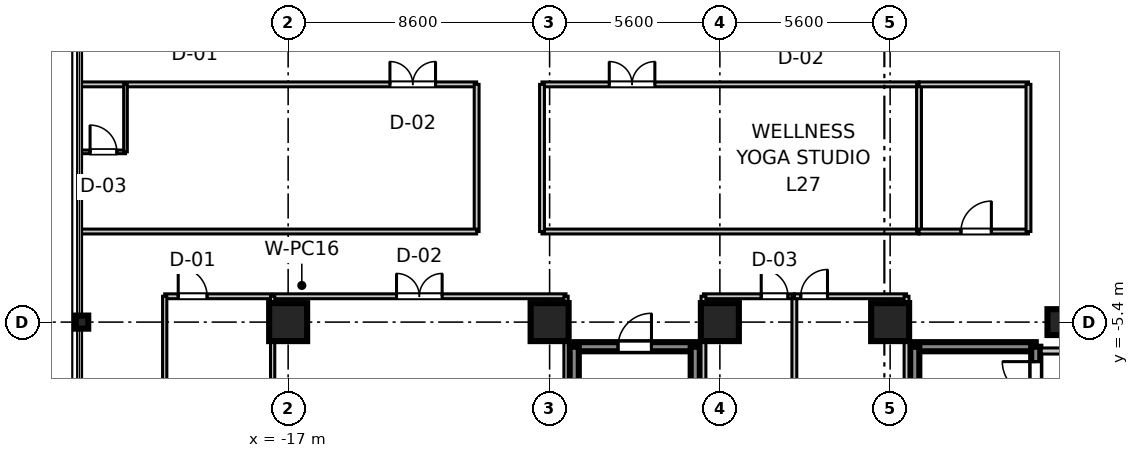
"""IFC4 building model, lengths in metres.
Left out: names, types, materials, properties, quantities, classifications, styles, units other than length and angle.
Written with IfcOpenShell. Run it as: python <this file> out.ifc"""

import sys

from ifc_helpers import new_model, si_unit, direction, frame, frame_2d, origin, origin_2d, place, context, subcontext, project, spatial, rectangle, i_section, extrude, source, transform, mapped, element, fill, save


model = new_model("IFC4")
c1 = context("Model", 3, precision=1e-05, world=origin(), true_north=direction((0.0, 1.0)))
c2 = subcontext(c1, "Body", "Model", "MODEL_VIEW")
j1 = project(units=[si_unit("LENGTHUNIT", "METRE"), si_unit("PLANEANGLEUNIT", "RADIAN")], contexts=[c1])
p1 = place(None, origin())
s1 = spatial("IfcSite", under=j1, at=p1, CompositionType="ELEMENT")
p2 = place(p1, origin())
s2 = spatial("IfcBuilding", under=s1, at=p2, CompositionType="ELEMENT")
p3 = place(p2, frame((0.0, 0.0, 110.2)))
s3 = spatial("IfcBuildingStorey", under=s2, at=p3, CompositionType="ELEMENT", Elevation=110.2)
m1 = source(origin(), c2, "Body", "SweptSolid", [
    extrude(rectangle(XDim=1.25, YDim=1.25, at=origin_2d()), origin(), (0.0, 0.0, 1.0), 3.605),
])
for number, where, z_axis, x_axis in (
    (1, (-17.0, -5.4, 0.0), (0.0, 0.0, 1.0), (1.0, 0.0, 0.0)),
    (2, (-8.4, -5.4, 0.0), (0.0, 0.0, 1.0), (1.0, 0.0, 0.0)),
    (3, (-2.8, -5.4, 0.0), (0.0, 0.0, 1.0), (1.0, 0.0, 0.0)),
    (4, (2.8, -5.4, 0.0), (0.0, 0.0, 1.0), (1.0, 0.0, 0.0)),
):
    element("IfcColumn", number, at=place(p3, frame(where, z_axis=z_axis, x_axis=x_axis)), inside=s3, PredefinedType="COLUMN", context=c2, shape_type="MappedRepresentation", body=[
        mapped(m1, transform((0.0, 0.0, 0.0), scale=1.0)),
    ])
m2 = source(origin(), c2, "Body", "SweptSolid", [
    extrude(rectangle(XDim=0.85, YDim=0.85, at=origin_2d()), origin(), (0.0, 0.0, 1.0), 3.605),
])
p4 = place(p3, frame((8.4, -5.4, 0.0), z_axis=(0.0, 0.0, 1.0), x_axis=(1.0, 0.0, 0.0)))
e5 = element("IfcColumn", 5, at=p4, inside=s3, PredefinedType="PILASTER", context=c2, shape_type="MappedRepresentation", body=[
    mapped(m2, transform((0.0, 0.0, 0.0), scale=1.0)),
])
m3 = source(origin(), c2, "Body", "SweptSolid", [
    extrude(i_section(OverallWidth=0.409, OverallDepth=0.43, WebThickness=0.021, FlangeThickness=0.034, at=origin_2d()), origin(), (0.0, 0.0, 1.0), 3.605),
])
p5 = place(p3, frame((-23.78, -5.4, 0.0), z_axis=(0.0, 0.0, 1.0), x_axis=(1.0, 0.0, 0.0)))
e6 = element("IfcColumn", 6, at=p5, inside=s3, PredefinedType="COLUMN", context=c2, shape_type="MappedRepresentation", body=[
    mapped(m3, transform((0.0, 0.0, 0.0), scale=1.0)),
])
m4 = source(origin(), c2, "Body", "SweptSolid", [
    extrude(rectangle(XDim=3.98, YDim=0.3, at=frame_2d((1.99, 0.0))), origin(), (0.0, 0.0, 1.0), 3.38),
])
p6 = place(p3, frame((3.61, -6.21, 0.0), z_axis=(0.0, 0.0, 1.0), x_axis=(1.0, 0.0, 0.0)))
e7 = element("IfcWall", 7, at=p6, inside=s3, PredefinedType="SHEAR", context=c2, shape_type="MappedRepresentation", body=[
    mapped(m4, transform((0.0, 0.0, 0.0), scale=1.0)),
])
m5 = source(origin(), c2, "Body", "SweptSolid", [
    extrude(rectangle(XDim=9.38, YDim=0.3, at=frame_2d((4.69, 0.0))), origin(), (0.0, 0.0, 1.0), 3.38),
])
p7 = place(p3, frame((3.61, -15.59, 0.0), z_axis=(0.0, 0.0, 1.0), x_axis=(0.0, 1.0, 0.0)))
e8 = element("IfcWall", 8, at=p7, inside=s3, PredefinedType="SHEAR", context=c2, shape_type="MappedRepresentation", body=[
    mapped(m5, transform((0.0, 0.0, 0.0), scale=1.0)),
])
p8 = place(p3, frame((7.59, -15.59, 0.0), z_axis=(0.0, 0.0, 1.0), x_axis=(0.0, 1.0, 0.0)))
e9 = element("IfcWall", 9, at=p8, inside=s3, PredefinedType="SHEAR", context=c2, shape_type="MappedRepresentation", body=[
    mapped(m5, transform((0.0, 0.0, 0.0), scale=1.0)),
])
p9 = place(p8, frame((7.79, 0.0, 0.0)))
e10 = element("IfcOpeningElement", 10, at=p9, cuts=e9, PredefinedType="OPENING", context=c2, shape_type="SweptSolid", body=[
    extrude(rectangle(XDim=1.1, YDim=2.15, at=frame_2d((0.55, 1.075))), frame((0.0, 0.16, 0.0), z_axis=(0.0, -1.0, 0.0), x_axis=(1.0, 0.0, 0.0)), (0.0, 0.0, 1.0), 0.32),
])
p10 = place(p3, frame((-7.59, -6.21, 0.0), z_axis=(0.0, 0.0, 1.0), x_axis=(1.0, 0.0, 0.0)))
e11 = element("IfcWall", 11, at=p10, inside=s3, PredefinedType="SHEAR", context=c2, shape_type="MappedRepresentation", body=[
    mapped(m4, transform((0.0, 0.0, 0.0), scale=1.0)),
])
p11 = place(p10, frame((1.44, 0.0, 0.0)))
e12 = element("IfcOpeningElement", 12, at=p11, cuts=e11, PredefinedType="OPENING", context=c2, shape_type="SweptSolid", body=[
    extrude(rectangle(XDim=1.1, YDim=2.15, at=frame_2d((0.55, 1.075))), frame((0.0, 0.16, 0.0), z_axis=(0.0, -1.0, 0.0), x_axis=(1.0, 0.0, 0.0)), (0.0, 0.0, 1.0), 0.32),
])
for number, where, z_axis, x_axis in (
    (13, (-7.59, -15.59, 0.0), (0.0, 0.0, 1.0), (0.0, 1.0, 0.0)),
    (14, (-3.61, -15.59, 0.0), (0.0, 0.0, 1.0), (0.0, 1.0, 0.0)),
):
    element("IfcWall", number, at=place(p3, frame(where, z_axis=z_axis, x_axis=x_axis)), inside=s3, PredefinedType="SHEAR", context=c2, shape_type="MappedRepresentation", body=[
        mapped(m5, transform((0.0, 0.0, 0.0), scale=1.0)),
    ])
m6 = source(origin(), c2, "Body", "SweptSolid", [
    extrude(rectangle(XDim=0.97, YDim=0.2, at=frame_2d((0.485, 0.0))), origin(), (0.0, 0.0, 1.0), 2.72),
])
p12 = place(p3, frame((7.77, -6.35, 0.0), z_axis=(0.0, 0.0, 1.0), x_axis=(1.0, 0.0, 0.0)))
e15 = element("IfcWall", 15, at=p12, inside=s3, PredefinedType="PARTITIONING", context=c2, shape_type="MappedRepresentation", body=[
    mapped(m6, transform((0.0, 0.0, 0.0), scale=1.0)),
])
m7 = source(origin(), c2, "Body", "SweptSolid", [
    extrude(rectangle(XDim=13.2, YDim=0.16, at=frame_2d((6.6, 0.0))), origin(), (0.0, 0.0, 1.0), 2.72),
])
p13 = place(p3, frame((-21.06, -4.55, 0.0), z_axis=(0.0, 0.0, 1.0), x_axis=(1.0, 0.0, 0.0)))
e16 = element("IfcWall", 16, at=p13, inside=s3, PredefinedType="PARTITIONING", context=c2, shape_type="MappedRepresentation", body=[
    mapped(m7, transform((0.0, 0.0, 0.0), scale=1.0)),
])
p14 = place(p13, frame((0.444, 0.0, 0.0)))
e17 = element("IfcOpeningElement", 17, at=p14, cuts=e16, PredefinedType="OPENING", context=c2, shape_type="SweptSolid", body=[
    extrude(rectangle(XDim=0.95, YDim=2.1, at=frame_2d((0.475, 1.05))), frame((0.0, 0.09, 0.0), z_axis=(0.0, -1.0, 0.0), x_axis=(1.0, 0.0, 0.0)), (0.0, 0.0, 1.0), 0.18),
])
p15 = place(p13, frame((7.625, 0.0, 0.0)))
e18 = element("IfcOpeningElement", 18, at=p15, cuts=e16, PredefinedType="OPENING", context=c2, shape_type="SweptSolid", body=[
    extrude(rectangle(XDim=1.5, YDim=2.15, at=frame_2d((0.75, 1.075))), frame((0.0, 0.09, 0.0), z_axis=(0.0, -1.0, 0.0), x_axis=(1.0, 0.0, 0.0)), (0.0, 0.0, 1.0), 0.18),
])
m8 = source(origin(), c2, "Body", "SweptSolid", [
    extrude(rectangle(XDim=17.83, YDim=0.14, at=frame_2d((8.915, 0.0))), origin(), (0.0, 0.0, 1.0), 2.72),
])
p16 = place(p3, frame((-21.06, -22.38, 0.0), z_axis=(0.0, 0.0, 1.0), x_axis=(0.0, 1.0, 0.0)))
e19 = element("IfcWall", 19, at=p16, inside=s3, PredefinedType="PARTITIONING", context=c2, shape_type="MappedRepresentation", body=[
    mapped(m8, transform((0.0, 0.0, 0.0), scale=1.0)),
])
m9 = source(origin(), c2, "Body", "SweptSolid", [
    extrude(rectangle(XDim=19.25, YDim=0.14, at=frame_2d((9.625, 0.0))), origin(), (0.0, 0.0, 1.0), 2.72),
])
for number, where, z_axis, x_axis in (
    (20, (-7.86, -23.8, 0.0), (0.0, 0.0, 1.0), (0.0, 1.0, 0.0)),
    (21, (-17.51, -23.8, 0.0), (0.0, 0.0, 1.0), (0.0, 1.0, 0.0)),
):
    element("IfcWall", number, at=place(p3, frame(where, z_axis=z_axis, x_axis=x_axis)), inside=s3, PredefinedType="PARTITIONING", context=c2, shape_type="MappedRepresentation", body=[
        mapped(m9, transform((0.0, 0.0, 0.0), scale=1.0)),
    ])
m10 = source(origin(), c2, "Body", "SweptSolid", [
    extrude(rectangle(XDim=2.99, YDim=0.16, at=frame_2d((1.495, 0.0))), origin(), (0.0, 0.0, 1.0), 2.72),
])
p17 = place(p3, frame((-3.34, -4.55, 0.0), z_axis=(0.0, 0.0, 1.0), x_axis=(1.0, 0.0, 0.0)))
e22 = element("IfcWall", 22, at=p17, inside=s3, PredefinedType="PARTITIONING", context=c2, shape_type="MappedRepresentation", body=[
    mapped(m10, transform((0.0, 0.0, 0.0), scale=1.0)),
])
p18 = place(p17, frame((1.9, 0.0, 0.0)))
e23 = element("IfcOpeningElement", 23, at=p18, cuts=e22, PredefinedType="OPENING", context=c2, shape_type="SweptSolid", body=[
    extrude(rectangle(XDim=0.88, YDim=2.1, at=frame_2d((0.44, 1.05))), frame((0.0, 0.09, 0.0), z_axis=(0.0, -1.0, 0.0), x_axis=(1.0, 0.0, 0.0)), (0.0, 0.0, 1.0), 0.18),
])
m11 = source(origin(), c2, "Body", "SweptSolid", [
    extrude(rectangle(XDim=19.25, YDim=0.16, at=frame_2d((9.625, 0.0))), origin(), (0.0, 0.0, 1.0), 2.72),
])
for number, where, z_axis, x_axis in (
    (24, (-3.34, -23.8, 0.0), (0.0, 0.0, 1.0), (0.0, 1.0, 0.0)),
    (25, (-0.35, -23.8, 0.0), (0.0, 0.0, 1.0), (0.0, 1.0, 0.0)),
):
    element("IfcWall", number, at=place(p3, frame(where, z_axis=z_axis, x_axis=x_axis)), inside=s3, PredefinedType="PARTITIONING", context=c2, shape_type="MappedRepresentation", body=[
        mapped(m11, transform((0.0, 0.0, 0.0), scale=1.0)),
    ])
m12 = source(origin(), c2, "Body", "SweptSolid", [
    extrude(rectangle(XDim=3.69, YDim=0.16, at=frame_2d((1.845, 0.0))), origin(), (0.0, 0.0, 1.0), 2.72),
])
p19 = place(p3, frame((-0.35, -4.55, 0.0), z_axis=(0.0, 0.0, 1.0), x_axis=(1.0, 0.0, 0.0)))
e26 = element("IfcWall", 26, at=p19, inside=s3, PredefinedType="PARTITIONING", context=c2, shape_type="MappedRepresentation", body=[
    mapped(m12, transform((0.0, 0.0, 0.0), scale=1.0)),
])
p20 = place(p19, frame((0.21, 0.0, 0.0)))
e27 = element("IfcOpeningElement", 27, at=p20, cuts=e26, PredefinedType="OPENING", context=c2, shape_type="SweptSolid", body=[
    extrude(rectangle(XDim=0.88, YDim=2.1, at=frame_2d((0.44, 1.05))), frame((0.0, 0.09, 0.0), z_axis=(0.0, -1.0, 0.0), x_axis=(1.0, 0.0, 0.0)), (0.0, 0.0, 1.0), 0.18),
])
p21 = place(p3, frame((3.34, -23.8, 0.0), z_axis=(0.0, 0.0, 1.0), x_axis=(0.0, 1.0, 0.0)))
e28 = element("IfcWall", 28, at=p21, inside=s3, PredefinedType="PARTITIONING", context=c2, shape_type="MappedRepresentation", body=[
    mapped(m11, transform((0.0, 0.0, 0.0), scale=1.0)),
])
m13 = source(origin(), c2, "Body", "SweptSolid", [
    extrude(rectangle(XDim=13.0, YDim=0.16, at=frame_2d((6.5, 0.0))), origin(), (0.0, 0.0, 1.0), 2.72),
])
p22 = place(p3, frame((-23.8, 2.42, 0.0), z_axis=(0.0, 0.0, 1.0), x_axis=(1.0, 0.0, 0.0)))
e29 = element("IfcWall", 29, at=p22, inside=s3, PredefinedType="PARTITIONING", context=c2, shape_type="MappedRepresentation", body=[
    mapped(m13, transform((0.0, 0.0, 0.0), scale=1.0)),
])
p23 = place(p22, frame((10.148, 0.0, 0.0)))
e30 = element("IfcOpeningElement", 30, at=p23, cuts=e29, PredefinedType="OPENING", context=c2, shape_type="SweptSolid", body=[
    extrude(rectangle(XDim=1.5, YDim=2.15, at=frame_2d((0.75, 1.075))), frame((0.0, 0.09, 0.0), z_axis=(0.0, -1.0, 0.0), x_axis=(1.0, 0.0, 0.0)), (0.0, 0.0, 1.0), 0.18),
])
m14 = source(origin(), c2, "Body", "SweptSolid", [
    extrude(rectangle(XDim=4.84, YDim=0.16, at=frame_2d((2.42, 0.0))), origin(), (0.0, 0.0, 1.0), 2.72),
])
p24 = place(p3, frame((-10.8, -2.42, 0.0), z_axis=(0.0, 0.0, 1.0), x_axis=(0.0, 1.0, 0.0)))
e31 = element("IfcWall", 31, at=p24, inside=s3, PredefinedType="PARTITIONING", context=c2, shape_type="MappedRepresentation", body=[
    mapped(m14, transform((0.0, 0.0, 0.0), scale=1.0)),
])
p25 = place(p3, frame((-23.8, -2.42, 0.0), z_axis=(0.0, 0.0, 1.0), x_axis=(1.0, 0.0, 0.0)))
e32 = element("IfcWall", 32, at=p25, inside=s3, PredefinedType="PARTITIONING", context=c2, shape_type="MappedRepresentation", body=[
    mapped(m13, transform((0.0, 0.0, 0.0), scale=1.0)),
])
m15 = source(origin(), c2, "Body", "SweptSolid", [
    extrude(rectangle(XDim=1.45, YDim=0.12, at=frame_2d((0.725, 0.0))), origin(), (0.0, 0.0, 1.0), 2.72),
])
p26 = place(p3, frame((-23.8, 0.2, 0.0), z_axis=(0.0, 0.0, 1.0), x_axis=(1.0, 0.0, 0.0)))
e33 = element("IfcWall", 33, at=p26, inside=s3, PredefinedType="PARTITIONING", context=c2, shape_type="MappedRepresentation", body=[
    mapped(m15, transform((0.0, 0.0, 0.0), scale=1.0)),
])
p27 = place(p26, frame((0.285, 0.0, 0.0)))
e34 = element("IfcOpeningElement", 34, at=p27, cuts=e33, PredefinedType="OPENING", context=c2, shape_type="SweptSolid", body=[
    extrude(rectangle(XDim=0.88, YDim=2.1, at=frame_2d((0.44, 1.05))), frame((0.0, 0.07, 0.0), z_axis=(0.0, -1.0, 0.0), x_axis=(1.0, 0.0, 0.0)), (0.0, 0.0, 1.0), 0.14),
])
m16 = source(origin(), c2, "Body", "SweptSolid", [
    extrude(rectangle(XDim=2.22, YDim=0.12, at=frame_2d((1.11, 0.0))), origin(), (0.0, 0.0, 1.0), 2.72),
])
p28 = place(p3, frame((-22.35, 0.2, 0.0), z_axis=(0.0, 0.0, 1.0), x_axis=(0.0, 1.0, 0.0)))
e35 = element("IfcWall", 35, at=p28, inside=s3, PredefinedType="PARTITIONING", context=c2, shape_type="MappedRepresentation", body=[
    mapped(m16, transform((0.0, 0.0, 0.0), scale=1.0)),
])
m17 = source(origin(), c2, "Body", "SweptSolid", [
    extrude(rectangle(XDim=12.4, YDim=0.16, at=frame_2d((6.2, 0.0))), origin(), (0.0, 0.0, 1.0), 2.72),
])
p29 = place(p3, frame((-8.65, -2.42, 0.0), z_axis=(0.0, 0.0, 1.0), x_axis=(1.0, 0.0, 0.0)))
e36 = element("IfcWall", 36, at=p29, inside=s3, PredefinedType="PARTITIONING", context=c2, shape_type="MappedRepresentation", body=[
    mapped(m17, transform((0.0, 0.0, 0.0), scale=1.0)),
])
p30 = place(p3, frame((-8.65, 2.42, 0.0), z_axis=(0.0, 0.0, 1.0), x_axis=(1.0, 0.0, 0.0)))
e37 = element("IfcWall", 37, at=p30, inside=s3, PredefinedType="PARTITIONING", context=c2, shape_type="MappedRepresentation", body=[
    mapped(m17, transform((0.0, 0.0, 0.0), scale=1.0)),
])
p31 = place(p30, frame((2.212, 0.0, 0.0)))
e38 = element("IfcOpeningElement", 38, at=p31, cuts=e37, PredefinedType="OPENING", context=c2, shape_type="SweptSolid", body=[
    extrude(rectangle(XDim=1.5, YDim=2.15, at=frame_2d((0.75, 1.075))), frame((0.0, 0.09, 0.0), z_axis=(0.0, -1.0, 0.0), x_axis=(1.0, 0.0, 0.0)), (0.0, 0.0, 1.0), 0.18),
])
for number, where, z_axis, x_axis in (
    (39, (-8.65, -2.42, 0.0), (0.0, 0.0, 1.0), (0.0, 1.0, 0.0)),
    (40, (3.75, -2.42, 0.0), (0.0, 0.0, 1.0), (0.0, 1.0, 0.0)),
):
    element("IfcWall", number, at=place(p3, frame(where, z_axis=z_axis, x_axis=x_axis)), inside=s3, PredefinedType="PARTITIONING", context=c2, shape_type="MappedRepresentation", body=[
        mapped(m14, transform((0.0, 0.0, 0.0), scale=1.0)),
    ])
m18 = source(origin(), c2, "Body", "SweptSolid", [
    extrude(rectangle(XDim=3.6, YDim=0.16, at=frame_2d((1.8, 0.0))), origin(), (0.0, 0.0, 1.0), 2.72),
])
p32 = place(p3, frame((3.75, -2.42, 0.0), z_axis=(0.0, 0.0, 1.0), x_axis=(1.0, 0.0, 0.0)))
e41 = element("IfcWall", 41, at=p32, inside=s3, PredefinedType="PARTITIONING", context=c2, shape_type="MappedRepresentation", body=[
    mapped(m18, transform((0.0, 0.0, 0.0), scale=1.0)),
])
p33 = place(p32, frame((1.38, 0.0, 0.0)))
e42 = element("IfcOpeningElement", 42, at=p33, cuts=e41, PredefinedType="OPENING", context=c2, shape_type="SweptSolid", body=[
    extrude(rectangle(XDim=1.0, YDim=2.1, at=frame_2d((0.5, 1.05))), frame((0.0, 0.09, 0.0), z_axis=(0.0, -1.0, 0.0), x_axis=(1.0, 0.0, 0.0)), (0.0, 0.0, 1.0), 0.18),
])
p34 = place(p3, frame((3.75, 2.42, 0.0), z_axis=(0.0, 0.0, 1.0), x_axis=(1.0, 0.0, 0.0)))
e43 = element("IfcWall", 43, at=p34, inside=s3, PredefinedType="PARTITIONING", context=c2, shape_type="MappedRepresentation", body=[
    mapped(m18, transform((0.0, 0.0, 0.0), scale=1.0)),
])
p35 = place(p3, frame((7.35, -2.42, 0.0), z_axis=(0.0, 0.0, 1.0), x_axis=(0.0, 1.0, 0.0)))
e44 = element("IfcWall", 44, at=p35, inside=s3, PredefinedType="PARTITIONING", context=c2, shape_type="MappedRepresentation", body=[
    mapped(m14, transform((0.0, 0.0, 0.0), scale=1.0)),
])
m19 = source(origin(), c2, "Body", "SweptSolid", [
    extrude(rectangle(XDim=1.1, YDim=2.15, at=frame_2d((0.55, 1.075))), frame((0.0, 0.025, 0.0), z_axis=(0.0, -1.0, 0.0), x_axis=(1.0, 0.0, 0.0)), (0.0, 0.0, 1.0), 0.05),
])
p36 = place(p9, origin())
e45 = element("IfcDoor", 45, at=p36, inside=s3, OperationType="SINGLE_SWING_RIGHT", PredefinedType="DOOR", context=c2, shape_type="MappedRepresentation", body=[
    mapped(m19, transform((0.0, 0.0, 0.0), scale=1.0)),
])
fill(e10, e45)
p37 = place(p11, frame((1.1, 0.0, 0.0), z_axis=(0.0, 0.0, 1.0), x_axis=(-1.0, 0.0, 0.0)))
e46 = element("IfcDoor", 46, at=p37, inside=s3, OperationType="SINGLE_SWING_RIGHT", PredefinedType="DOOR", context=c2, shape_type="MappedRepresentation", body=[
    mapped(m19, transform((0.0, 0.0, 0.0), scale=1.0)),
])
fill(e12, e46)
m20 = source(origin(), c2, "Body", "SweptSolid", [
    extrude(rectangle(XDim=0.95, YDim=2.1, at=frame_2d((0.475, 1.05))), frame((0.0, 0.025, 0.0), z_axis=(0.0, -1.0, 0.0), x_axis=(1.0, 0.0, 0.0)), (0.0, 0.0, 1.0), 0.05),
])
p38 = place(p14, frame((0.95, 0.0, 0.0), z_axis=(0.0, 0.0, 1.0), x_axis=(-1.0, 0.0, 0.0)))
e47 = element("IfcDoor", 47, at=p38, inside=s3, OperationType="SINGLE_SWING_LEFT", PredefinedType="DOOR", context=c2, shape_type="MappedRepresentation", body=[
    mapped(m20, transform((0.0, 0.0, 0.0), scale=1.0)),
])
fill(e17, e47)
m21 = source(origin(), c2, "Body", "SweptSolid", [
    extrude(rectangle(XDim=1.5, YDim=2.15, at=frame_2d((0.75, 1.075))), frame((0.0, 0.025, 0.0), z_axis=(0.0, -1.0, 0.0), x_axis=(1.0, 0.0, 0.0)), (0.0, 0.0, 1.0), 0.05),
])
p39 = place(p15, frame((1.5, 0.0, 0.0), z_axis=(0.0, 0.0, 1.0), x_axis=(-1.0, 0.0, 0.0)))
e48 = element("IfcDoor", 48, at=p39, inside=s3, OperationType="DOUBLE_DOOR_SINGLE_SWING", PredefinedType="DOOR", context=c2, shape_type="MappedRepresentation", body=[
    mapped(m21, transform((0.0, 0.0, 0.0), scale=1.0)),
])
fill(e18, e48)
m22 = source(origin(), c2, "Body", "SweptSolid", [
    extrude(rectangle(XDim=0.88, YDim=2.1, at=frame_2d((0.44, 1.05))), frame((0.0, 0.025, 0.0), z_axis=(0.0, -1.0, 0.0), x_axis=(1.0, 0.0, 0.0)), (0.0, 0.0, 1.0), 0.05),
])
p40 = place(p18, frame((0.88, 0.0, 0.0), z_axis=(0.0, 0.0, 1.0), x_axis=(-1.0, 0.0, 0.0)))
e49 = element("IfcDoor", 49, at=p40, inside=s3, OperationType="SINGLE_SWING_LEFT", PredefinedType="DOOR", context=c2, shape_type="MappedRepresentation", body=[
    mapped(m22, transform((0.0, 0.0, 0.0), scale=1.0)),
])
fill(e23, e49)
p41 = place(p20, frame((0.88, 0.0, 0.0), z_axis=(0.0, 0.0, 1.0), x_axis=(-1.0, 0.0, 0.0)))
e50 = element("IfcDoor", 50, at=p41, inside=s3, OperationType="SINGLE_SWING_RIGHT", PredefinedType="DOOR", context=c2, shape_type="MappedRepresentation", body=[
    mapped(m22, transform((0.0, 0.0, 0.0), scale=1.0)),
])
fill(e27, e50)
p42 = place(p27, origin())
e51 = element("IfcDoor", 51, at=p42, inside=s3, OperationType="SINGLE_SWING_LEFT", PredefinedType="DOOR", context=c2, shape_type="MappedRepresentation", body=[
    mapped(m22, transform((0.0, 0.0, 0.0), scale=1.0)),
])
fill(e34, e51)
p43 = place(p23, origin())
e52 = element("IfcDoor", 52, at=p43, inside=s3, OperationType="DOUBLE_DOOR_SINGLE_SWING", PredefinedType="DOOR", context=c2, shape_type="MappedRepresentation", body=[
    mapped(m21, transform((0.0, 0.0, 0.0), scale=1.0)),
])
fill(e30, e52)
p44 = place(p31, frame((1.5, 0.0, 0.0), z_axis=(0.0, 0.0, 1.0), x_axis=(-1.0, 0.0, 0.0)))
e53 = element("IfcDoor", 53, at=p44, inside=s3, OperationType="DOUBLE_DOOR_SINGLE_SWING", PredefinedType="DOOR", context=c2, shape_type="MappedRepresentation", body=[
    mapped(m21, transform((0.0, 0.0, 0.0), scale=1.0)),
])
fill(e38, e53)
m23 = source(origin(), c2, "Body", "SweptSolid", [
    extrude(rectangle(XDim=1.0, YDim=2.1, at=frame_2d((0.5, 1.05))), frame((0.0, 0.025, 0.0), z_axis=(0.0, -1.0, 0.0), x_axis=(1.0, 0.0, 0.0)), (0.0, 0.0, 1.0), 0.05),
])
p45 = place(p33, origin())
e54 = element("IfcDoor", 54, at=p45, inside=s3, OperationType="SINGLE_SWING_RIGHT", PredefinedType="DOOR", context=c2, shape_type="MappedRepresentation", body=[
    mapped(m23, transform((0.0, 0.0, 0.0), scale=1.0)),
])
fill(e42, e54)
save(model, sys.argv[1])
